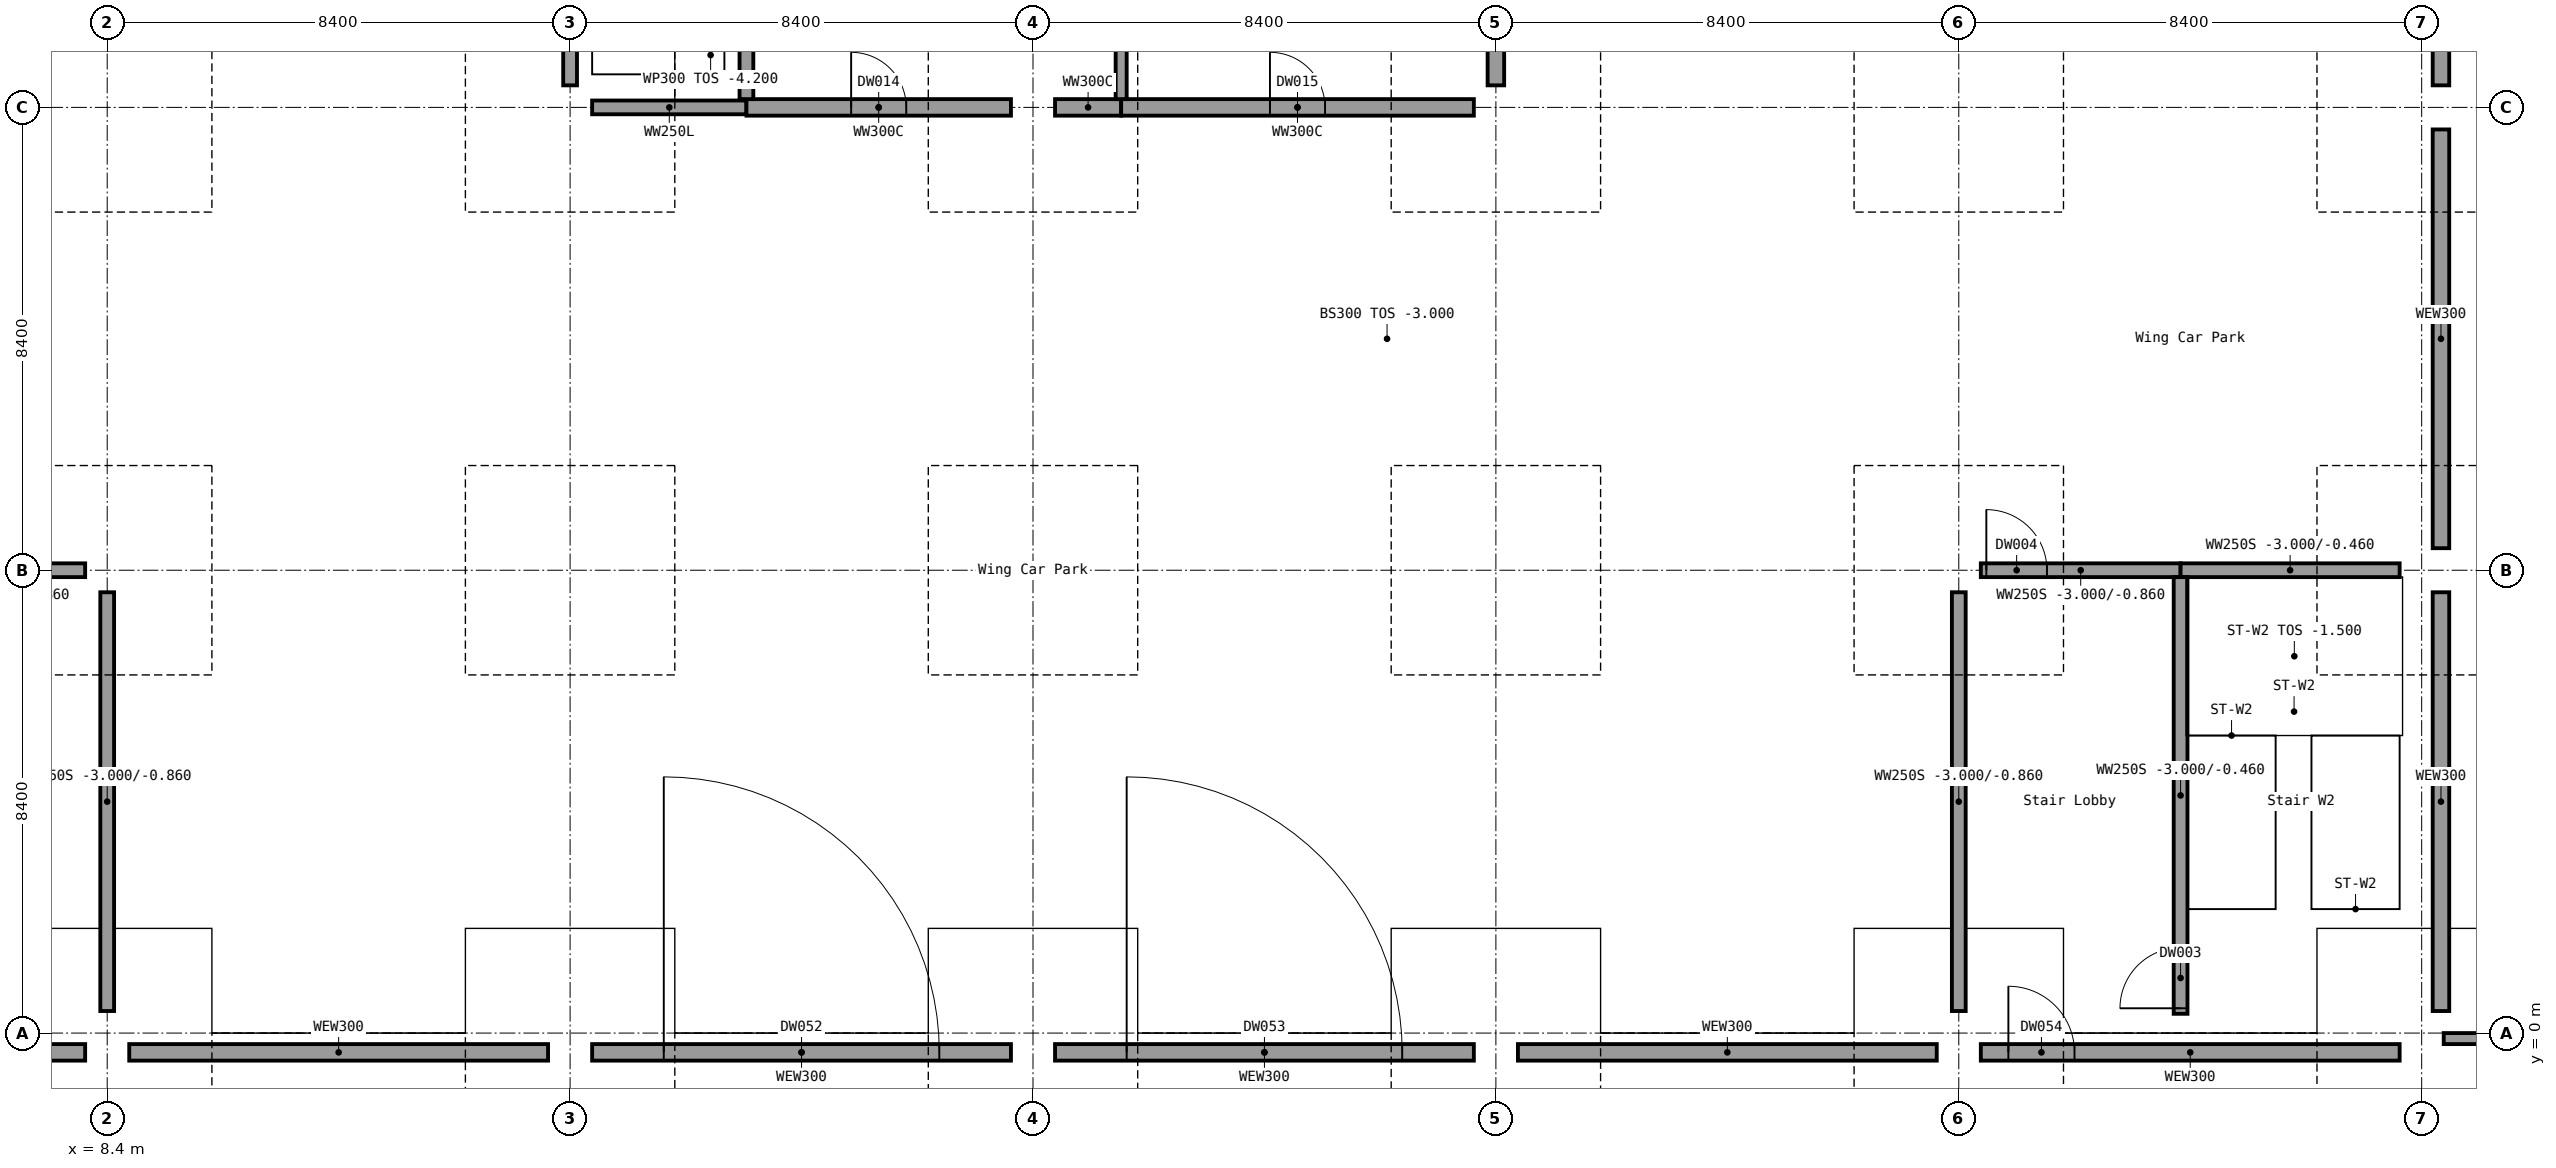
"""IFC4 building model, lengths in metres.
Left out: names, types, materials, properties, quantities, classifications, styles, units other than length and angle.
Written with IfcOpenShell. Run it as: python <this file> out.ifc"""

import sys

from ifc_helpers import new_model, si_unit, direction, frame, frame_2d, origin, origin_2d, place, context, subcontext, project, spatial, rectangle, extrude, element, fill, save


model = new_model("IFC4")
c1 = context("Model", 3, precision=1e-05, world=origin(), true_north=direction((0.0, 1.0)))
c2 = subcontext(c1, "Body", "Model", "MODEL_VIEW")
j1 = project(units=[si_unit("LENGTHUNIT", "METRE"), si_unit("PLANEANGLEUNIT", "RADIAN")], contexts=[c1])
p1 = place(None, origin())
s1 = spatial("IfcSite", under=j1, at=p1, CompositionType="ELEMENT")
p2 = place(p1, origin())
s2 = spatial("IfcBuilding", under=s1, at=p2, CompositionType="ELEMENT")
p3 = place(p2, frame((0.0, 0.0, -3.0)))
s3 = spatial("IfcBuildingStorey", under=s2, at=p3, CompositionType="ELEMENT", Elevation=-3.0)
for number, where, z_axis, x_axis in (
    (1, (8.4, 0.0, 0.0), (0.0, 0.0, 1.0), (1.0, 0.0, 0.0)),
    (2, (8.4, 8.4, 0.0), (0.0, 0.0, 1.0), (1.0, 0.0, 0.0)),
    (3, (8.4, 16.8, 0.0), (0.0, 0.0, 1.0), (1.0, 0.0, 0.0)),
    (4, (16.8, 0.0, 0.0), (0.0, 0.0, 1.0), (1.0, 0.0, 0.0)),
    (5, (16.8, 8.4, 0.0), (0.0, 0.0, 1.0), (1.0, 0.0, 0.0)),
    (6, (16.8, 16.8, 0.0), (0.0, 0.0, 1.0), (1.0, 0.0, 0.0)),
    (7, (25.2, 0.0, 0.0), (0.0, 0.0, 1.0), (1.0, 0.0, 0.0)),
    (8, (25.2, 8.4, 0.0), (0.0, 0.0, 1.0), (1.0, 0.0, 0.0)),
    (9, (25.2, 16.8, 0.0), (0.0, 0.0, 1.0), (1.0, 0.0, 0.0)),
    (10, (33.6, 0.0, 0.0), (0.0, 0.0, 1.0), (1.0, 0.0, 0.0)),
    (11, (33.6, 8.4, 0.0), (0.0, 0.0, 1.0), (1.0, 0.0, 0.0)),
    (12, (33.6, 16.8, 0.0), (0.0, 0.0, 1.0), (1.0, 0.0, 0.0)),
    (13, (42.0, 0.0, 0.0), (0.0, 0.0, 1.0), (1.0, 0.0, 0.0)),
    (14, (42.0, 8.4, 0.0), (0.0, 0.0, 1.0), (1.0, 0.0, 0.0)),
    (15, (42.0, 16.8, 0.0), (0.0, 0.0, 1.0), (1.0, 0.0, 0.0)),
    (16, (50.4, 0.0, 0.0), (0.0, 0.0, 1.0), (1.0, 0.0, 0.0)),
    (17, (50.4, 8.4, 0.0), (0.0, 0.0, 1.0), (1.0, 0.0, 0.0)),
    (18, (50.4, 16.8, 0.0), (0.0, 0.0, 1.0), (1.0, 0.0, 0.0)),
):
    element("IfcColumn", number, at=place(p3, frame(where, z_axis=z_axis, x_axis=x_axis)), inside=s3, PredefinedType="COLUMN", context=c2, shape_type="SweptSolid", body=[
        extrude(rectangle(XDim=0.8, YDim=0.8, at=origin_2d()), origin(), (0.0, 0.0, 1.0), 3.0),
    ])
p4 = place(p3, frame((50.8, -0.1, 0.0), z_axis=(0.0, 0.0, 1.0), x_axis=(1.0, 0.0, 0.0)))
e19 = element("IfcWall", 19, at=p4, inside=s3, PredefinedType="SOLIDWALL", context=c2, shape_type="SweptSolid", body=[
    extrude(rectangle(XDim=7.6, YDim=0.2, at=frame_2d((3.8, 0.0))), origin(), (0.0, 0.0, 1.0), 2.5),
])
p5 = place(p3, frame((0.4, -0.35, 0.0), z_axis=(0.0, 0.0, 1.0), x_axis=(1.0, 0.0, 0.0)))
e20 = element("IfcWall", 20, at=p5, inside=s3, PredefinedType="SOLIDWALL", context=c2, shape_type="SweptSolid", body=[
    extrude(rectangle(XDim=7.6, YDim=0.3, at=frame_2d((3.8, 0.0))), origin(), (0.0, 0.0, 1.0), 2.3),
])
p6 = place(p5, frame((4.6, 0.0, 0.0)))
e21 = element("IfcOpeningElement", 21, at=p6, cuts=e20, PredefinedType="OPENING", context=c2, shape_type="SweptSolid", body=[
    extrude(rectangle(XDim=1.2, YDim=2.1, at=frame_2d((0.6, 1.05))), frame((0.0, 0.15, 0.0), z_axis=(0.0, -1.0, 0.0), x_axis=(1.0, 0.0, 0.0)), (0.0, 0.0, 1.0), 0.3),
])
p7 = place(p3, frame((8.8, -0.35, 0.0), z_axis=(0.0, 0.0, 1.0), x_axis=(1.0, 0.0, 0.0)))
e22 = element("IfcWall", 22, at=p7, inside=s3, PredefinedType="SOLIDWALL", context=c2, shape_type="SweptSolid", body=[
    extrude(rectangle(XDim=7.6, YDim=0.3, at=frame_2d((3.8, 0.0))), origin(), (0.0, 0.0, 1.0), 2.3),
])
p8 = place(p3, frame((17.2, -0.35, 0.0), z_axis=(0.0, 0.0, 1.0), x_axis=(1.0, 0.0, 0.0)))
e23 = element("IfcWall", 23, at=p8, inside=s3, PredefinedType="SOLIDWALL", context=c2, shape_type="SweptSolid", body=[
    extrude(rectangle(XDim=7.6, YDim=0.3, at=frame_2d((3.8, 0.0))), origin(), (0.0, 0.0, 1.0), 2.3),
])
p9 = place(p8, frame((1.3, 0.0, 0.0)))
e24 = element("IfcOpeningElement", 24, at=p9, cuts=e23, PredefinedType="OPENING", context=c2, shape_type="SweptSolid", body=[
    extrude(rectangle(XDim=5.0, YDim=2.1, at=frame_2d((2.5, 1.05))), frame((0.0, 0.15, 0.0), z_axis=(0.0, -1.0, 0.0), x_axis=(1.0, 0.0, 0.0)), (0.0, 0.0, 1.0), 0.3),
])
p10 = place(p3, frame((25.6, -0.35, 0.0), z_axis=(0.0, 0.0, 1.0), x_axis=(1.0, 0.0, 0.0)))
e25 = element("IfcWall", 25, at=p10, inside=s3, PredefinedType="SOLIDWALL", context=c2, shape_type="SweptSolid", body=[
    extrude(rectangle(XDim=7.6, YDim=0.3, at=frame_2d((3.8, 0.0))), origin(), (0.0, 0.0, 1.0), 2.3),
])
p11 = place(p10, frame((1.3, 0.0, 0.0)))
e26 = element("IfcOpeningElement", 26, at=p11, cuts=e25, PredefinedType="OPENING", context=c2, shape_type="SweptSolid", body=[
    extrude(rectangle(XDim=5.0, YDim=2.1, at=frame_2d((2.5, 1.05))), frame((0.0, 0.15, 0.0), z_axis=(0.0, -1.0, 0.0), x_axis=(1.0, 0.0, 0.0)), (0.0, 0.0, 1.0), 0.3),
])
p12 = place(p3, frame((34.0, -0.35, 0.0), z_axis=(0.0, 0.0, 1.0), x_axis=(1.0, 0.0, 0.0)))
e27 = element("IfcWall", 27, at=p12, inside=s3, PredefinedType="SOLIDWALL", context=c2, shape_type="SweptSolid", body=[
    extrude(rectangle(XDim=7.6, YDim=0.3, at=frame_2d((3.8, 0.0))), origin(), (0.0, 0.0, 1.0), 2.3),
])
p13 = place(p3, frame((42.4, -0.35, 0.0), z_axis=(0.0, 0.0, 1.0), x_axis=(1.0, 0.0, 0.0)))
e28 = element("IfcWall", 28, at=p13, inside=s3, PredefinedType="SOLIDWALL", context=c2, shape_type="SweptSolid", body=[
    extrude(rectangle(XDim=7.6, YDim=0.3, at=frame_2d((3.8, 0.0))), origin(), (0.0, 0.0, 1.0), 2.3),
])
p14 = place(p13, frame((0.5, 0.0, 0.0)))
e29 = element("IfcOpeningElement", 29, at=p14, cuts=e28, PredefinedType="OPENING", context=c2, shape_type="SweptSolid", body=[
    extrude(rectangle(XDim=1.2, YDim=2.1, at=frame_2d((0.6, 1.05))), frame((0.0, 0.15, 0.0), z_axis=(0.0, -1.0, 0.0), x_axis=(1.0, 0.0, 0.0)), (0.0, 0.0, 1.0), 0.3),
])
p15 = place(p3, frame((50.75, 0.4, 0.0), z_axis=(0.0, 0.0, 1.0), x_axis=(0.0, 1.0, 0.0)))
e30 = element("IfcWall", 30, at=p15, inside=s3, PredefinedType="SOLIDWALL", context=c2, shape_type="SweptSolid", body=[
    extrude(rectangle(XDim=7.6, YDim=0.3, at=frame_2d((3.8, 0.0))), origin(), (0.0, 0.0, 1.0), 2.3),
])
p16 = place(p3, frame((50.75, 8.8, 0.0), z_axis=(0.0, 0.0, 1.0), x_axis=(0.0, 1.0, 0.0)))
e31 = element("IfcWall", 31, at=p16, inside=s3, PredefinedType="SOLIDWALL", context=c2, shape_type="SweptSolid", body=[
    extrude(rectangle(XDim=7.6, YDim=0.3, at=frame_2d((3.8, 0.0))), origin(), (0.0, 0.0, 1.0), 2.3),
])
p17 = place(p3, frame((50.75, 17.2, 0.0), z_axis=(0.0, 0.0, 1.0), x_axis=(0.0, 1.0, 0.0)))
e32 = element("IfcWall", 32, at=p17, inside=s3, PredefinedType="SOLIDWALL", context=c2, shape_type="SweptSolid", body=[
    extrude(rectangle(XDim=7.6, YDim=0.3, at=frame_2d((3.8, 0.0))), origin(), (0.0, 0.0, 1.0), 2.3),
])
p18 = place(p3, frame((4.375, 8.4, 0.0), z_axis=(0.0, 0.0, 1.0), x_axis=(1.0, 0.0, 0.0)))
e33 = element("IfcWall", 33, at=p18, inside=s3, PredefinedType="SHEAR", context=c2, shape_type="SweptSolid", body=[
    extrude(rectangle(XDim=3.625, YDim=0.25, at=frame_2d((1.812, 0.0))), origin(), (0.0, 0.0, 1.0), 2.14),
])
p19 = place(p18, frame((0.1, 0.0, 0.0)))
e34 = element("IfcOpeningElement", 34, at=p19, cuts=e33, PredefinedType="OPENING", context=c2, shape_type="SweptSolid", body=[
    extrude(rectangle(XDim=1.1, YDim=2.1, at=frame_2d((0.55, 1.05))), frame((0.0, 0.125, 0.0), z_axis=(0.0, -1.0, 0.0), x_axis=(1.0, 0.0, 0.0)), (0.0, 0.0, 1.0), 0.25),
])
p20 = place(p3, frame((42.4, 8.4, 0.0), z_axis=(0.0, 0.0, 1.0), x_axis=(1.0, 0.0, 0.0)))
e35 = element("IfcWall", 35, at=p20, inside=s3, PredefinedType="SHEAR", context=c2, shape_type="SweptSolid", body=[
    extrude(rectangle(XDim=3.625, YDim=0.25, at=frame_2d((1.812, 0.0))), origin(), (0.0, 0.0, 1.0), 2.14),
])
p21 = place(p20, frame((0.1, 0.0, 0.0)))
e36 = element("IfcOpeningElement", 36, at=p21, cuts=e35, PredefinedType="OPENING", context=c2, shape_type="SweptSolid", body=[
    extrude(rectangle(XDim=1.1, YDim=2.1, at=frame_2d((0.55, 1.05))), frame((0.0, 0.125, 0.0), z_axis=(0.0, -1.0, 0.0), x_axis=(1.0, 0.0, 0.0)), (0.0, 0.0, 1.0), 0.25),
])
p22 = place(p3, frame((46.025, 8.4, 0.0), z_axis=(0.0, 0.0, 1.0), x_axis=(1.0, 0.0, 0.0)))
e37 = element("IfcWall", 37, at=p22, inside=s3, PredefinedType="SHEAR", context=c2, shape_type="SweptSolid", body=[
    extrude(rectangle(XDim=3.975, YDim=0.25, at=frame_2d((1.988, 0.0))), origin(), (0.0, 0.0, 1.0), 2.54),
])
p23 = place(p3, frame((17.2, 16.8, -1.2), z_axis=(0.0, 0.0, 1.0), x_axis=(1.0, 0.0, 0.0)))
e38 = element("IfcWall", 38, at=p23, inside=s3, PredefinedType="SHEAR", context=c2, shape_type="SweptSolid", body=[
    extrude(rectangle(XDim=2.8, YDim=0.25, at=frame_2d((1.4, 0.0))), origin(), (0.0, 0.0, 1.0), 3.74),
])
p24 = place(p3, frame((20.0, 16.8, 0.0), z_axis=(0.0, 0.0, 1.0), x_axis=(1.0, 0.0, 0.0)))
e39 = element("IfcWall", 39, at=p24, inside=s3, PredefinedType="SHEAR", context=c2, shape_type="SweptSolid", body=[
    extrude(rectangle(XDim=4.8, YDim=0.3, at=frame_2d((2.4, 0.0))), origin(), (0.0, 0.0, 1.0), 2.54),
])
p25 = place(p24, frame((1.9, 0.0, 0.0)))
e40 = element("IfcOpeningElement", 40, at=p25, cuts=e39, PredefinedType="OPENING", context=c2, shape_type="SweptSolid", body=[
    extrude(rectangle(XDim=1.0, YDim=2.1, at=frame_2d((0.5, 1.05))), frame((0.0, 0.15, 0.0), z_axis=(0.0, -1.0, 0.0), x_axis=(1.0, 0.0, 0.0)), (0.0, 0.0, 1.0), 0.3),
])
p26 = place(p3, frame((25.6, 16.8, 0.0), z_axis=(0.0, 0.0, 1.0), x_axis=(1.0, 0.0, 0.0)))
e41 = element("IfcWall", 41, at=p26, inside=s3, PredefinedType="SHEAR", context=c2, shape_type="SweptSolid", body=[
    extrude(rectangle(XDim=1.2, YDim=0.3, at=frame_2d((0.6, 0.0))), origin(), (0.0, 0.0, 1.0), 2.54),
])
p27 = place(p3, frame((26.8, 16.8, 0.0), z_axis=(0.0, 0.0, 1.0), x_axis=(1.0, 0.0, 0.0)))
e42 = element("IfcWall", 42, at=p27, inside=s3, PredefinedType="SHEAR", context=c2, shape_type="SweptSolid", body=[
    extrude(rectangle(XDim=6.4, YDim=0.3, at=frame_2d((3.2, 0.0))), origin(), (0.0, 0.0, 1.0), 2.54),
])
p28 = place(p27, frame((2.7, 0.0, 0.0)))
e43 = element("IfcOpeningElement", 43, at=p28, cuts=e42, PredefinedType="OPENING", context=c2, shape_type="SweptSolid", body=[
    extrude(rectangle(XDim=1.0, YDim=2.1, at=frame_2d((0.5, 1.05))), frame((0.0, 0.15, 0.0), z_axis=(0.0, -1.0, 0.0), x_axis=(1.0, 0.0, 0.0)), (0.0, 0.0, 1.0), 0.3),
])
p29 = place(p3, frame((8.4, 0.4, 0.0), z_axis=(0.0, 0.0, 1.0), x_axis=(0.0, 1.0, 0.0)))
e44 = element("IfcWall", 44, at=p29, inside=s3, PredefinedType="SHEAR", context=c2, shape_type="SweptSolid", body=[
    extrude(rectangle(XDim=7.6, YDim=0.25, at=frame_2d((3.8, 0.0))), origin(), (0.0, 0.0, 1.0), 2.14),
])
p30 = place(p3, frame((16.8, 17.2, -1.2), z_axis=(0.0, 0.0, 1.0), x_axis=(0.0, 1.0, 0.0)))
e45 = element("IfcWall", 45, at=p30, inside=s3, PredefinedType="SHEAR", context=c2, shape_type="SweptSolid", body=[
    extrude(rectangle(XDim=2.4, YDim=0.25, at=frame_2d((1.2, 0.0))), origin(), (0.0, 0.0, 1.0), 3.74),
])
p31 = place(p30, frame((0.65, 0.0, 1.2)))
e46 = element("IfcOpeningElement", 46, at=p31, cuts=e45, PredefinedType="OPENING", context=c2, shape_type="SweptSolid", body=[
    extrude(rectangle(XDim=1.1, YDim=2.1, at=frame_2d((0.55, 1.05))), frame((0.0, 0.125, 0.0), z_axis=(0.0, -1.0, 0.0), x_axis=(1.0, 0.0, 0.0)), (0.0, 0.0, 1.0), 0.25),
])
p32 = place(p3, frame((20.0, 16.95, -1.2), z_axis=(0.0, 0.0, 1.0), x_axis=(0.0, 1.0, 0.0)))
e47 = element("IfcWall", 47, at=p32, inside=s3, PredefinedType="SHEAR", context=c2, shape_type="SweptSolid", body=[
    extrude(rectangle(XDim=2.65, YDim=0.25, at=frame_2d((1.325, 0.0))), origin(), (0.0, 0.0, 1.0), 3.74),
])
p33 = place(p3, frame((26.8, 16.95, 0.0), z_axis=(0.0, 0.0, 1.0), x_axis=(0.0, 1.0, 0.0)))
e48 = element("IfcWall", 48, at=p33, inside=s3, PredefinedType="SOLIDWALL", context=c2, shape_type="SweptSolid", body=[
    extrude(rectangle(XDim=7.55, YDim=0.2, at=frame_2d((3.775, 0.0))), origin(), (0.0, 0.0, 1.0), 2.54),
])
p34 = place(p3, frame((33.6, 17.2, 0.0), z_axis=(0.0, 0.0, 1.0), x_axis=(0.0, 1.0, 0.0)))
e49 = element("IfcWall", 49, at=p34, inside=s3, PredefinedType="SHEAR", context=c2, shape_type="SweptSolid", body=[
    extrude(rectangle(XDim=7.4, YDim=0.3, at=frame_2d((3.7, 0.0))), origin(), (0.0, 0.0, 1.0), 2.54),
])
p35 = place(p3, frame((42.0, 0.4, 0.0), z_axis=(0.0, 0.0, 1.0), x_axis=(0.0, 1.0, 0.0)))
e50 = element("IfcWall", 50, at=p35, inside=s3, PredefinedType="SHEAR", context=c2, shape_type="SweptSolid", body=[
    extrude(rectangle(XDim=7.6, YDim=0.25, at=frame_2d((3.8, 0.0))), origin(), (0.0, 0.0, 1.0), 2.14),
])
p36 = place(p3, frame((46.025, 0.35, 0.0), z_axis=(0.0, 0.0, 1.0), x_axis=(0.0, 1.0, 0.0)))
e51 = element("IfcWall", 51, at=p36, inside=s3, PredefinedType="SHEAR", context=c2, shape_type="SweptSolid", body=[
    extrude(rectangle(XDim=7.925, YDim=0.25, at=frame_2d((3.962, 0.0))), origin(), (0.0, 0.0, 1.0), 2.54),
])
p37 = place(p36, frame((0.1, 0.0, 0.0)))
e52 = element("IfcOpeningElement", 52, at=p37, cuts=e51, PredefinedType="OPENING", context=c2, shape_type="SweptSolid", body=[
    extrude(rectangle(XDim=1.1, YDim=2.1, at=frame_2d((0.55, 1.05))), frame((0.0, 0.125, 0.0), z_axis=(0.0, -1.0, 0.0), x_axis=(1.0, 0.0, 0.0)), (0.0, 0.0, 1.0), 0.25),
])
p38 = place(p9, origin())
e53 = element("IfcDoor", 53, at=p38, inside=s3, OperationType="ROLLINGUP", PredefinedType="DOOR", context=c2, shape_type="SweptSolid", body=[
    extrude(rectangle(XDim=5.0, YDim=2.1, at=frame_2d((2.5, 1.05))), frame((0.0, 0.025, 0.0), z_axis=(0.0, -1.0, 0.0), x_axis=(1.0, 0.0, 0.0)), (0.0, 0.0, 1.0), 0.05),
])
fill(e24, e53)
p39 = place(p11, origin())
e54 = element("IfcDoor", 54, at=p39, inside=s3, OperationType="ROLLINGUP", PredefinedType="DOOR", context=c2, shape_type="SweptSolid", body=[
    extrude(rectangle(XDim=5.0, YDim=2.1, at=frame_2d((2.5, 1.05))), frame((0.0, 0.025, 0.0), z_axis=(0.0, -1.0, 0.0), x_axis=(1.0, 0.0, 0.0)), (0.0, 0.0, 1.0), 0.05),
])
fill(e26, e54)
p40 = place(p14, origin())
e55 = element("IfcDoor", 55, at=p40, inside=s3, OperationType="SINGLE_SWING_LEFT", PredefinedType="DOOR", context=c2, shape_type="SweptSolid", body=[
    extrude(rectangle(XDim=1.2, YDim=2.1, at=frame_2d((0.6, 1.05))), frame((0.0, 0.025, 0.0), z_axis=(0.0, -1.0, 0.0), x_axis=(1.0, 0.0, 0.0)), (0.0, 0.0, 1.0), 0.05),
])
fill(e29, e55)
p41 = place(p37, origin())
e56 = element("IfcDoor", 56, at=p41, inside=s3, OperationType="SINGLE_SWING_LEFT", PredefinedType="DOOR", context=c2, shape_type="SweptSolid", body=[
    extrude(rectangle(XDim=1.1, YDim=2.1, at=frame_2d((0.55, 1.05))), frame((0.0, 0.025, 0.0), z_axis=(0.0, -1.0, 0.0), x_axis=(1.0, 0.0, 0.0)), (0.0, 0.0, 1.0), 0.05),
])
fill(e52, e56)
p42 = place(p21, origin())
e57 = element("IfcDoor", 57, at=p42, inside=s3, OperationType="SINGLE_SWING_LEFT", PredefinedType="DOOR", context=c2, shape_type="SweptSolid", body=[
    extrude(rectangle(XDim=1.1, YDim=2.1, at=frame_2d((0.55, 1.05))), frame((0.0, 0.025, 0.0), z_axis=(0.0, -1.0, 0.0), x_axis=(1.0, 0.0, 0.0)), (0.0, 0.0, 1.0), 0.05),
])
fill(e36, e57)
p43 = place(p25, origin())
e58 = element("IfcDoor", 58, at=p43, inside=s3, OperationType="SINGLE_SWING_LEFT", PredefinedType="DOOR", context=c2, shape_type="SweptSolid", body=[
    extrude(rectangle(XDim=1.0, YDim=2.1, at=frame_2d((0.5, 1.05))), frame((0.0, 0.025, 0.0), z_axis=(0.0, -1.0, 0.0), x_axis=(1.0, 0.0, 0.0)), (0.0, 0.0, 1.0), 0.05),
])
fill(e40, e58)
p44 = place(p28, origin())
e59 = element("IfcDoor", 59, at=p44, inside=s3, OperationType="SINGLE_SWING_LEFT", PredefinedType="DOOR", context=c2, shape_type="SweptSolid", body=[
    extrude(rectangle(XDim=1.0, YDim=2.1, at=frame_2d((0.5, 1.05))), frame((0.0, 0.025, 0.0), z_axis=(0.0, -1.0, 0.0), x_axis=(1.0, 0.0, 0.0)), (0.0, 0.0, 1.0), 0.05),
])
fill(e43, e59)
save(model, sys.argv[1])
